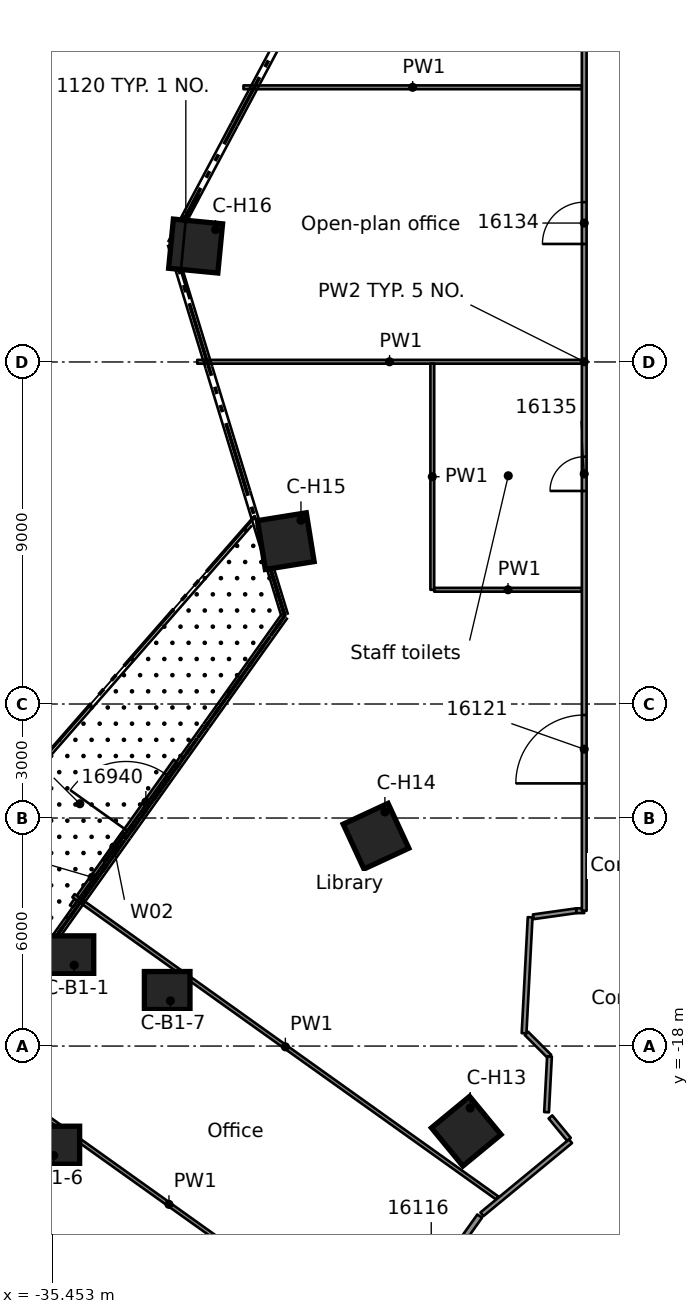
"""IFC4 building model, lengths in metres.
Left out: names, types, materials, properties, quantities, classifications, styles, units other than length and angle.
Written with IfcOpenShell. Run it as: python <this file> out.ifc"""

import sys

from ifc_helpers import new_model, si_unit, direction, frame, frame_2d, origin, origin_2d, place, context, subcontext, project, spatial, rectangle, extrude, element, fill, save


model = new_model("IFC4")
c1 = context("Model", 3, precision=1e-05, world=origin(), true_north=direction((0.0, 1.0)))
c2 = subcontext(c1, "Body", "Model", "MODEL_VIEW")
j1 = project(units=[si_unit("LENGTHUNIT", "METRE"), si_unit("PLANEANGLEUNIT", "RADIAN")], contexts=[c1])
p1 = place(None, origin())
s1 = spatial("IfcSite", under=j1, at=p1, CompositionType="ELEMENT")
p2 = place(p1, origin())
s2 = spatial("IfcBuilding", under=s1, at=p2, CompositionType="ELEMENT")
p3 = place(p2, frame((0.0, 0.0, 80.7)))
s3 = spatial("IfcBuildingStorey", under=s2, at=p3, CompositionType="ELEMENT", Elevation=80.7)
for number, where, z_axis, x_axis in (
    (1, (-34.957, -15.6, 0.0), (0.0, 0.0, 1.0), (1.0, 0.0, 0.0)),
    (2, (-35.328, -20.609, 0.0), (0.0, 0.0, 1.0), (1.0, 0.0, 0.0)),
    (3, (-32.424, -16.539, 0.0), (0.0, 0.0, 1.0), (1.0, 0.0, 0.0)),
):
    element("IfcColumn", number, at=place(p3, frame(where, z_axis=z_axis, x_axis=x_axis)), inside=s3, PredefinedType="COLUMN", context=c2, shape_type="SweptSolid", body=[
        extrude(rectangle(XDim=1.2, YDim=1.0, at=origin_2d()), origin(), (0.0, 0.0, 1.0), 3.5),
    ])
for number, where, z_axis, x_axis in (
    (4, (-24.555, -20.241, 0.0), (0.0, 0.0, 1.0), (-0.772, -0.636, 0.0)),
    (5, (-26.929, -12.478, 0.0), (0.0, 0.0, 1.0), (-0.907, -0.42, 0.0)),
    (6, (-29.302, -4.714, 0.0), (0.0, 0.0, 1.0), (-0.987, -0.159, 0.0)),
    (7, (-31.676, 3.05, 0.0), (0.0, 0.0, 1.0), (-0.995, 0.096, 0.0)),
):
    element("IfcColumn", number, at=place(p3, frame(where, z_axis=z_axis, x_axis=x_axis)), inside=s3, PredefinedType="COLUMN", context=c2, shape_type="SweptSolid", body=[
        extrude(rectangle(XDim=1.3, YDim=1.3, at=origin_2d()), origin(), (0.0, 0.0, 1.0), 3.5),
    ])
p4 = place(p3, frame((-34.943, -14.324, 0.0), z_axis=(0.0, 0.0, 1.0), x_axis=(0.580693274378, 0.814122423897, 0.0)))
e8 = element("IfcWall", 8, at=p4, inside=s3, PredefinedType="STANDARD", context=c2, shape_type="SweptSolid", body=[
    extrude(rectangle(XDim=4.706, YDim=0.1, at=frame_2d((2.353, 0.0))), origin(), (0.0, 0.0, 1.0), 3.1),
])
p5 = place(p4, frame((2.472, 0.0, 0.0)))
e9 = element("IfcOpeningElement", 9, at=p5, cuts=e8, PredefinedType="OPENING", context=c2, shape_type="SweptSolid", body=[
    extrude(rectangle(XDim=1.8, YDim=2.4, at=frame_2d((0.9, 1.2))), frame((0.0, 0.06, 0.0), z_axis=(0.0, -1.0, 0.0), x_axis=(1.0, 0.0, 0.0)), (0.0, 0.0, 1.0), 0.12),
])
p6 = place(p4, frame((1.472, 0.0, 0.0)))
e10 = element("IfcOpeningElement", 10, at=p6, cuts=e8, PredefinedType="OPENING", context=c2, shape_type="SweptSolid", body=[
    extrude(rectangle(XDim=0.9, YDim=2.4, at=frame_2d((0.45, 1.2))), frame((0.0, 0.06, 0.0), z_axis=(0.0, -1.0, 0.0), x_axis=(1.0, 0.0, 0.0)), (0.0, 0.0, 1.0), 0.12),
])
p7 = place(p3, frame((-22.339, -19.865, 0.0), z_axis=(0.0, 0.0, 1.0), x_axis=(0.636075239072, -0.771627040895, 0.0)))
e11 = element("IfcWall", 11, at=p7, inside=s3, PredefinedType="PARTITIONING", context=c2, shape_type="SweptSolid", body=[
    extrude(rectangle(XDim=0.767, YDim=0.125, at=frame_2d((0.384, 0.0))), origin(), (0.0, 0.0, 1.0), 3.08),
])
p8 = place(p3, frame((-40.875, -22.433, 0.0), z_axis=(0.0, 0.0, 1.0), x_axis=(0.814093136476, -0.58073433267, 0.0)))
e12 = element("IfcWall", 12, at=p8, inside=s3, PredefinedType="PARTITIONING", context=c2, shape_type="SweptSolid", body=[
    extrude(rectangle(XDim=13.524, YDim=0.1, at=frame_2d((6.762, 0.0))), origin(), (0.0, 0.0, 1.0), 3.08),
])
p9 = place(p3, frame((-37.883, -18.239, 0.0), z_axis=(0.0, 0.0, 1.0), x_axis=(0.814185756817, -0.580604472423, 0.0)))
e13 = element("IfcWall", 13, at=p9, inside=s3, PredefinedType="PARTITIONING", context=c2, shape_type="SweptSolid", body=[
    extrude(rectangle(XDim=13.524, YDim=0.1, at=frame_2d((6.762, 0.0))), origin(), (0.0, 0.0, 1.0), 3.08),
])
p10 = place(p3, frame((-34.89, -14.043, 0.0), z_axis=(0.0, 0.0, 1.0), x_axis=(0.814106649966, -0.580715388534, 0.0)))
e14 = element("IfcWall", 14, at=p10, inside=s3, PredefinedType="PARTITIONING", context=c2, shape_type="SweptSolid", body=[
    extrude(rectangle(XDim=13.697, YDim=0.1, at=frame_2d((6.849, 0.0))), origin(), (0.0, 0.0, 1.0), 3.08),
])
p11 = place(p3, frame((-22.971, -17.666, 0.0), z_axis=(0.0, 0.0, 1.0), x_axis=(0.706538139097, -0.707674966352, 0.0)))
e15 = element("IfcWall", 15, at=p11, inside=s3, PredefinedType="PARTITIONING", context=c2, shape_type="SweptSolid", body=[
    extrude(rectangle(XDim=0.859, YDim=0.125, at=frame_2d((0.43, 0.0))), origin(), (0.0, 0.0, 1.0), 3.08),
])
p12 = place(p3, frame((-21.662, -14.439, 0.0), z_axis=(0.0, 0.0, 1.0), x_axis=(1.0, 0.0, 0.0)))
e16 = element("IfcWall", 16, at=p12, inside=s3, PredefinedType="PARTITIONING", context=c2, shape_type="SweptSolid", body=[
    extrude(rectangle(XDim=0.212, YDim=0.125, at=frame_2d((0.106, 0.0))), origin(), (0.0, 0.0, 1.0), 3.08),
])
p13 = place(p3, frame((-25.398, -5.994, 0.0), z_axis=(0.0, 0.0, 1.0), x_axis=(1.0, 0.0, 0.0)))
e17 = element("IfcWall", 17, at=p13, inside=s3, PredefinedType="PARTITIONING", context=c2, shape_type="SweptSolid", body=[
    extrude(rectangle(XDim=3.886, YDim=0.1, at=frame_2d((1.943, 0.0))), origin(), (0.0, 0.0, 1.0), 3.08),
])
p14 = place(p3, frame((-31.633, 0.005, 0.0), z_axis=(0.0, 0.0, 1.0), x_axis=(1.0, 0.0, 0.0)))
e18 = element("IfcWall", 18, at=p14, inside=s3, PredefinedType="PARTITIONING", context=c2, shape_type="SweptSolid", body=[
    extrude(rectangle(XDim=10.121, YDim=0.1, at=frame_2d((5.061, 0.0))), origin(), (0.0, 0.0, 1.0), 3.08),
])
p15 = place(p3, frame((-30.417, 7.227, 0.0), z_axis=(0.0, 0.0, 1.0), x_axis=(1.0, 0.0, 0.0)))
e19 = element("IfcWall", 19, at=p15, inside=s3, PredefinedType="PARTITIONING", context=c2, shape_type="SweptSolid", body=[
    extrude(rectangle(XDim=8.905, YDim=0.1, at=frame_2d((4.453, 0.0))), origin(), (0.0, 0.0, 1.0), 3.08),
])
p16 = place(p3, frame((-22.792, -14.599, 0.0), z_axis=(0.0, 0.0, 1.0), x_axis=(0.990221510194, 0.139503981125, 0.0)))
e20 = element("IfcWall", 20, at=p16, inside=s3, PredefinedType="PARTITIONING", context=c2, shape_type="SweptSolid", body=[
    extrude(rectangle(XDim=1.141, YDim=0.125, at=frame_2d((0.571, 0.0))), origin(), (0.0, 0.0, 1.0), 3.08),
])
p17 = place(p3, frame((-24.142, -22.427, 0.0), z_axis=(0.0, 0.0, 1.0), x_axis=(0.771535887112, 0.636185802182, 0.0)))
e21 = element("IfcWall", 21, at=p17, inside=s3, PredefinedType="PARTITIONING", context=c2, shape_type="SweptSolid", body=[
    extrude(rectangle(XDim=3.021, YDim=0.125, at=frame_2d((1.511, 0.0))), origin(), (0.0, 0.0, 1.0), 3.08),
])
p18 = place(p3, frame((-20.857, -24.052, 0.0), z_axis=(0.0, 0.0, 1.0), x_axis=(0.560544895906, 0.828124036406, 0.0)))
e22 = element("IfcWall", 22, at=p18, inside=s3, PredefinedType="PARTITIONING", context=c2, shape_type="SweptSolid", body=[
    extrude(rectangle(XDim=3.472, YDim=0.15, at=frame_2d((1.736, 0.0))), origin(), (0.0, 0.0, 1.0), 3.08),
])
p19 = place(p3, frame((-37.621, -41.29, 0.0), z_axis=(0.0, 0.0, 1.0), x_axis=(0.580691447967, 0.814123726628, 0.0)))
e23 = element("IfcWall", 23, at=p19, inside=s3, PredefinedType="PARTITIONING", context=c2, shape_type="SweptSolid", body=[
    extrude(rectangle(XDim=23.111, YDim=0.15, at=frame_2d((11.555, 0.0))), origin(), (0.0, 0.0, 1.0), 3.08),
])
p20 = place(p19, frame((20.465, 0.0, 0.0)))
e24 = element("IfcOpeningElement", 24, at=p20, cuts=e23, PredefinedType="OPENING", context=c2, shape_type="SweptSolid", body=[
    extrude(rectangle(XDim=0.9, YDim=2.1, at=frame_2d((0.45, 1.05))), frame((0.0, 0.085, 0.0), z_axis=(0.0, -1.0, 0.0), x_axis=(1.0, 0.0, 0.0)), (0.0, 0.0, 1.0), 0.17),
])
p21 = place(p19, frame((15.561, 0.0, 0.0)))
e25 = element("IfcOpeningElement", 25, at=p21, cuts=e23, PredefinedType="OPENING", context=c2, shape_type="SweptSolid", body=[
    extrude(rectangle(XDim=0.9, YDim=2.1, at=frame_2d((0.45, 1.05))), frame((0.0, 0.085, 0.0), z_axis=(0.0, -1.0, 0.0), x_axis=(1.0, 0.0, 0.0)), (0.0, 0.0, 1.0), 0.17),
])
p22 = place(p19, frame((8.662, 0.0, 0.0)))
e26 = element("IfcOpeningElement", 26, at=p22, cuts=e23, PredefinedType="OPENING", context=c2, shape_type="SweptSolid", body=[
    extrude(rectangle(XDim=0.9, YDim=2.1, at=frame_2d((0.45, 1.05))), frame((0.0, 0.085, 0.0), z_axis=(0.0, -1.0, 0.0), x_axis=(1.0, 0.0, 0.0)), (0.0, 0.0, 1.0), 0.17),
])
p23 = place(p3, frame((-22.441, -19.74, 0.0), z_axis=(0.0, 0.0, 1.0), x_axis=(0.052384264045, 0.998627001878, 0.0)))
e27 = element("IfcWall", 27, at=p23, inside=s3, PredefinedType="PARTITIONING", context=c2, shape_type="SweptSolid", body=[
    extrude(rectangle(XDim=1.468, YDim=0.125, at=frame_2d((0.734, 0.0))), origin(), (0.0, 0.0, 1.0), 3.08),
])
p24 = place(p3, frame((-23.033, -17.663, 0.0), z_axis=(0.0, 0.0, 1.0), x_axis=(0.052324034434, 0.998630159479, 0.0)))
e28 = element("IfcWall", 28, at=p24, inside=s3, PredefinedType="PARTITIONING", context=c2, shape_type="SweptSolid", body=[
    extrude(rectangle(XDim=3.056, YDim=0.125, at=frame_2d((1.528, 0.0))), origin(), (0.0, 0.0, 1.0), 3.08),
])
p25 = place(p3, frame((-21.45, -14.439, 0.0), z_axis=(0.0, 0.0, 1.0), x_axis=(0.0, 1.0, 0.0)))
e29 = element("IfcWall", 29, at=p25, inside=s3, PredefinedType="PARTITIONING", context=c2, shape_type="SweptSolid", body=[
    extrude(rectangle(XDim=28.89, YDim=0.125, at=frame_2d((14.445, 0.0))), origin(), (0.0, 0.0, 1.0), 3.08),
])
p26 = place(p25, frame((3.35, 0.0, 0.0)))
e30 = element("IfcOpeningElement", 30, at=p26, cuts=e29, PredefinedType="OPENING", context=c2, shape_type="SweptSolid", body=[
    extrude(rectangle(XDim=1.8, YDim=2.1, at=frame_2d((0.9, 1.05))), frame((0.0, 0.073, 0.0), z_axis=(0.0, -1.0, 0.0), x_axis=(1.0, 0.0, 0.0)), (0.0, 0.0, 1.0), 0.145),
])
p27 = place(p25, frame((17.544, 0.0, 0.0)))
e31 = element("IfcOpeningElement", 31, at=p27, cuts=e29, PredefinedType="OPENING", context=c2, shape_type="SweptSolid", body=[
    extrude(rectangle(XDim=1.1, YDim=2.1, at=frame_2d((0.55, 1.05))), frame((0.0, 0.073, 0.0), z_axis=(0.0, -1.0, 0.0), x_axis=(1.0, 0.0, 0.0)), (0.0, 0.0, 1.0), 0.145),
])
p28 = place(p25, frame((11.045, 0.0, 0.0)))
e32 = element("IfcOpeningElement", 32, at=p28, cuts=e29, PredefinedType="OPENING", context=c2, shape_type="SweptSolid", body=[
    extrude(rectangle(XDim=0.9, YDim=2.1, at=frame_2d((0.45, 1.05))), frame((0.0, 0.073, 0.0), z_axis=(0.0, -1.0, 0.0), x_axis=(1.0, 0.0, 0.0)), (0.0, 0.0, 1.0), 0.145),
])
p29 = place(p3, frame((-25.448, -5.994, 0.0), z_axis=(0.0, 0.0, 1.0), x_axis=(0.0, 1.0, 0.0)))
e33 = element("IfcWall", 33, at=p29, inside=s3, PredefinedType="PARTITIONING", context=c2, shape_type="SweptSolid", body=[
    extrude(rectangle(XDim=5.949, YDim=0.1, at=frame_2d((2.975, 0.0))), origin(), (0.0, 0.0, 1.0), 3.08),
])
p30 = place(p5, origin())
e34 = element("IfcDoor", 34, at=p30, inside=s3, OperationType="DOUBLE_DOOR_SINGLE_SWING", PredefinedType="DOOR", context=c2, shape_type="SweptSolid", body=[
    extrude(rectangle(XDim=1.8, YDim=2.4, at=frame_2d((0.9, 1.2))), frame((0.0, 0.025, 0.0), z_axis=(0.0, -1.0, 0.0), x_axis=(1.0, 0.0, 0.0)), (0.0, 0.0, 1.0), 0.05),
])
fill(e9, e34)
p31 = place(p6, origin())
e35 = element("IfcWindow", 35, at=p31, inside=s3, PartitioningType="SINGLE_PANEL", PredefinedType="WINDOW", context=c2, shape_type="SweptSolid", body=[
    extrude(rectangle(XDim=0.9, YDim=2.4, at=frame_2d((0.45, 1.2))), frame((0.0, 0.03, 0.0), z_axis=(0.0, -1.0, 0.0), x_axis=(1.0, 0.0, 0.0)), (0.0, 0.0, 1.0), 0.06),
])
fill(e10, e35)
p32 = place(p26, origin())
e36 = element("IfcDoor", 36, at=p32, inside=s3, OperationType="DOUBLE_DOOR_SINGLE_SWING", PredefinedType="DOOR", context=c2, shape_type="SweptSolid", body=[
    extrude(rectangle(XDim=1.8, YDim=2.1, at=frame_2d((0.9, 1.05))), frame((0.0, 0.025, 0.0), z_axis=(0.0, -1.0, 0.0), x_axis=(1.0, 0.0, 0.0)), (0.0, 0.0, 1.0), 0.05),
])
fill(e30, e36)
p33 = place(p27, origin())
e37 = element("IfcDoor", 37, at=p33, inside=s3, OperationType="SINGLE_SWING_RIGHT", PredefinedType="DOOR", context=c2, shape_type="SweptSolid", body=[
    extrude(rectangle(XDim=1.1, YDim=2.1, at=frame_2d((0.55, 1.05))), frame((0.0, 0.025, 0.0), z_axis=(0.0, -1.0, 0.0), x_axis=(1.0, 0.0, 0.0)), (0.0, 0.0, 1.0), 0.05),
])
fill(e31, e37)
p34 = place(p28, origin())
e38 = element("IfcDoor", 38, at=p34, inside=s3, OperationType="SINGLE_SWING_LEFT", PredefinedType="DOOR", context=c2, shape_type="SweptSolid", body=[
    extrude(rectangle(XDim=0.9, YDim=2.1, at=frame_2d((0.45, 1.05))), frame((0.0, 0.025, 0.0), z_axis=(0.0, -1.0, 0.0), x_axis=(1.0, 0.0, 0.0)), (0.0, 0.0, 1.0), 0.05),
])
fill(e32, e38)
save(model, sys.argv[1])
